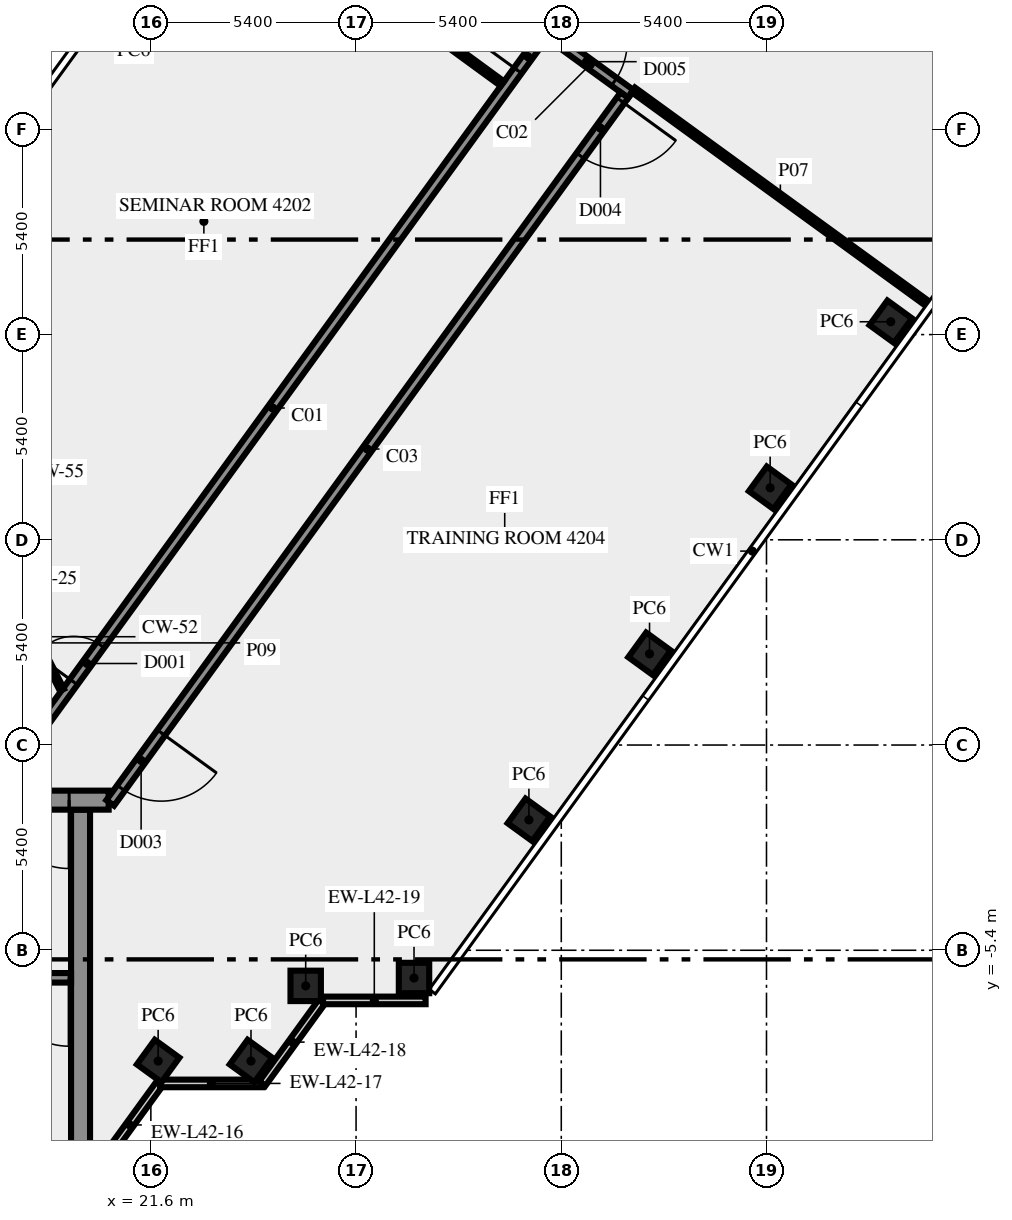
"""IFC4 building model, lengths in metres.
Left out: names, types, materials, properties, quantities, classifications, styles, units other than length and angle.
Written with IfcOpenShell. Run it as: python <this file> out.ifc"""

import sys

from ifc_helpers import new_model, si_unit, direction, frame, frame_2d, origin, origin_2d, place, context, subcontext, project, spatial, rectangle, extrude, element, fill, save


model = new_model("IFC4")
c1 = context("Model", 3, precision=1e-05, world=origin(), true_north=direction((0.0, 1.0)))
c2 = subcontext(c1, "Body", "Model", "MODEL_VIEW")
j1 = project(units=[si_unit("LENGTHUNIT", "METRE"), si_unit("PLANEANGLEUNIT", "RADIAN")], contexts=[c1])
p1 = place(None, origin())
s1 = spatial("IfcSite", under=j1, at=p1, CompositionType="ELEMENT")
p2 = place(p1, origin())
s2 = spatial("IfcBuilding", under=s1, at=p2, CompositionType="ELEMENT")
p3 = place(p2, frame((0.0, 0.0, 180.0)))
s3 = spatial("IfcBuildingStorey", under=s2, at=p3, CompositionType="ELEMENT", Elevation=180.0)
for number, where, z_axis, x_axis in (
    (1, (21.792, -8.315, 0.0), (0.0, 0.0, 1.0), (0.588, 0.809, 0.0)),
    (2, (24.235, -8.315, 0.0), (0.0, 0.0, 1.0), (0.588, 0.809, 0.0)),
    (3, (25.674, -6.337, 0.0), (0.0, 0.0, 1.0), (1.0, 0.0, 0.0)),
    (4, (28.525, -6.13, 0.0), (0.0, 0.0, 1.0), (1.0, 0.0, 0.0)),
    (5, (31.548, -1.969, 0.0), (0.0, 0.0, 1.0), (0.588, 0.809, 0.0)),
    (6, (34.722, 2.4, 0.0), (0.0, 0.0, 1.0), (0.588, 0.809, 0.0)),
    (7, (37.896, 6.769, 0.0), (0.0, 0.0, 1.0), (0.588, 0.809, 0.0)),
    (8, (41.07, 11.137, 0.0), (0.0, 0.0, 1.0), (0.588, 0.809, 0.0)),
):
    element("IfcColumn", number, at=place(p3, frame(where, z_axis=z_axis, x_axis=x_axis)), inside=s3, PredefinedType="COLUMN", context=c2, shape_type="SweptSolid", body=[
        extrude(rectangle(XDim=0.8, YDim=0.8, at=origin_2d()), origin(), (0.0, 0.0, 1.0), 3.65),
    ])
p4 = place(p3, frame((20.253, -11.083, 0.0), z_axis=(0.0, 0.0, 1.0), x_axis=(0.587766567315, 0.809030569476, 0.0)))
e9 = element("IfcWall", 9, at=p4, inside=s3, PredefinedType="SOLIDWALL", context=c2, shape_type="SweptSolid", body=[
    extrude(rectangle(XDim=2.688, YDim=0.2, at=frame_2d((1.344, 0.0))), origin(), (0.0, 0.0, 1.0), 3.65),
])
p5 = place(p3, frame((21.843, -8.904, 0.0), z_axis=(0.0, 0.0, 1.0), x_axis=(1.0, 0.0, 0.0)))
e10 = element("IfcWall", 10, at=p5, inside=s3, PredefinedType="SOLIDWALL", context=c2, shape_type="SweptSolid", body=[
    extrude(rectangle(XDim=2.7, YDim=0.2, at=frame_2d((1.35, 0.0))), origin(), (0.0, 0.0, 1.0), 3.65),
])
p6 = place(p3, frame((24.533, -8.909, 0.0), z_axis=(0.0, 0.0, 1.0), x_axis=(0.587720002413, 0.809064397168, 0.0)))
e11 = element("IfcWall", 11, at=p6, inside=s3, PredefinedType="SOLIDWALL", context=c2, shape_type="SweptSolid", body=[
    extrude(rectangle(XDim=2.7, YDim=0.2, at=frame_2d((1.35, 0.0))), origin(), (0.0, 0.0, 1.0), 3.65),
])
p7 = place(p3, frame((26.13, -6.719, 0.0), z_axis=(0.0, 0.0, 1.0), x_axis=(1.0, 0.0, 0.0)))
e12 = element("IfcWall", 12, at=p7, inside=s3, PredefinedType="SOLIDWALL", context=c2, shape_type="SweptSolid", body=[
    extrude(rectangle(XDim=2.7, YDim=0.2, at=frame_2d((1.35, 0.0))), origin(), (0.0, 0.0, 1.0), 3.65),
])
p8 = place(p3, frame((19.75, -10.5, 0.0), z_axis=(0.0, 0.0, 1.0), x_axis=(0.0, 1.0, 0.0)))
e13 = element("IfcWall", 13, at=p8, inside=s3, PredefinedType="SHEAR", context=c2, shape_type="SweptSolid", body=[
    extrude(rectangle(XDim=8.8, YDim=0.5, at=frame_2d((4.4, 0.0))), origin(), (0.0, 0.0, 1.0), 3.65),
])
p9 = place(p3, frame((19.5, -6.125, 0.0), z_axis=(0.0, 0.0, 1.0), x_axis=(-1.0, 0.0, 0.0)))
e14 = element("IfcWall", 14, at=p9, inside=s3, PredefinedType="SHEAR", context=c2, shape_type="SweptSolid", body=[
    extrude(rectangle(XDim=8.05, YDim=0.25, at=frame_2d((4.025, 0.0))), origin(), (0.0, 0.0, 1.0), 3.65),
])
p10 = place(p9, frame((0.05, 0.0, 0.0)))
e15 = element("IfcOpeningElement", 15, at=p10, cuts=e14, PredefinedType="OPENING", context=c2, shape_type="SweptSolid", body=[
    extrude(rectangle(XDim=1.8, YDim=2.1, at=frame_2d((0.9, 1.05))), frame((0.0, 0.135, 0.0), z_axis=(0.0, -1.0, 0.0), x_axis=(1.0, 0.0, 0.0)), (0.0, 0.0, 1.0), 0.27),
])
p11 = place(p3, frame((20.49, -1.45, 0.0), z_axis=(0.0, 0.0, 1.0), x_axis=(-1.0, 0.0, 0.0)))
e16 = element("IfcWall", 16, at=p11, inside=s3, PredefinedType="SHEAR", context=c2, shape_type="SweptSolid", body=[
    extrude(rectangle(XDim=40.98, YDim=0.5, at=frame_2d((20.49, 0.0))), origin(), (0.0, 0.0, 1.0), 3.65),
])
p12 = place(p11, frame((38.14, 0.0, 0.0)))
e17 = element("IfcOpeningElement", 17, at=p12, cuts=e16, PredefinedType="OPENING", context=c2, shape_type="SweptSolid", body=[
    extrude(rectangle(XDim=1.8, YDim=2.1, at=frame_2d((0.9, 1.05))), frame((0.0, 0.26, 0.0), z_axis=(0.0, -1.0, 0.0), x_axis=(1.0, 0.0, 0.0)), (0.0, 0.0, 1.0), 0.52),
])
p13 = place(p11, frame((35.89, 0.0, 0.0)))
e18 = element("IfcOpeningElement", 18, at=p13, cuts=e16, PredefinedType="OPENING", context=c2, shape_type="SweptSolid", body=[
    extrude(rectangle(XDim=0.9, YDim=2.1, at=frame_2d((0.45, 1.05))), frame((0.0, 0.26, 0.0), z_axis=(0.0, -1.0, 0.0), x_axis=(1.0, 0.0, 0.0)), (0.0, 0.0, 1.0), 0.52),
])
p14 = place(p11, frame((32.94, 0.0, 0.0)))
e19 = element("IfcOpeningElement", 19, at=p14, cuts=e16, PredefinedType="OPENING", context=c2, shape_type="SweptSolid", body=[
    extrude(rectangle(XDim=0.9, YDim=2.1, at=frame_2d((0.45, 1.05))), frame((0.0, 0.26, 0.0), z_axis=(0.0, -1.0, 0.0), x_axis=(1.0, 0.0, 0.0)), (0.0, 0.0, 1.0), 0.52),
])
p15 = place(p11, frame((30.802, 0.0, 0.0)))
e20 = element("IfcOpeningElement", 20, at=p15, cuts=e16, PredefinedType="OPENING", context=c2, shape_type="SweptSolid", body=[
    extrude(rectangle(XDim=0.9, YDim=2.1, at=frame_2d((0.45, 1.05))), frame((0.0, 0.26, 0.0), z_axis=(0.0, -1.0, 0.0), x_axis=(1.0, 0.0, 0.0)), (0.0, 0.0, 1.0), 0.52),
])
p16 = place(p11, frame((29.24, 0.0, 0.0)))
e21 = element("IfcOpeningElement", 21, at=p16, cuts=e16, PredefinedType="OPENING", context=c2, shape_type="SweptSolid", body=[
    extrude(rectangle(XDim=0.9, YDim=2.1, at=frame_2d((0.45, 1.05))), frame((0.0, 0.26, 0.0), z_axis=(0.0, -1.0, 0.0), x_axis=(1.0, 0.0, 0.0)), (0.0, 0.0, 1.0), 0.52),
])
p17 = place(p11, frame((27.39, 0.0, 0.0)))
e22 = element("IfcOpeningElement", 22, at=p17, cuts=e16, PredefinedType="OPENING", context=c2, shape_type="SweptSolid", body=[
    extrude(rectangle(XDim=0.9, YDim=2.1, at=frame_2d((0.45, 1.05))), frame((0.0, 0.26, 0.0), z_axis=(0.0, -1.0, 0.0), x_axis=(1.0, 0.0, 0.0)), (0.0, 0.0, 1.0), 0.52),
])
p18 = place(p11, frame((25.228, 0.0, 0.0)))
e23 = element("IfcOpeningElement", 23, at=p18, cuts=e16, PredefinedType="OPENING", context=c2, shape_type="SweptSolid", body=[
    extrude(rectangle(XDim=0.9, YDim=2.1, at=frame_2d((0.45, 1.05))), frame((0.0, 0.26, 0.0), z_axis=(0.0, -1.0, 0.0), x_axis=(1.0, 0.0, 0.0)), (0.0, 0.0, 1.0), 0.52),
])
p19 = place(p11, frame((19.59, 0.0, 0.0)))
e24 = element("IfcOpeningElement", 24, at=p19, cuts=e16, PredefinedType="OPENING", context=c2, shape_type="SweptSolid", body=[
    extrude(rectangle(XDim=2.0, YDim=2.1, at=frame_2d((1.0, 1.05))), frame((0.0, 0.26, 0.0), z_axis=(0.0, -1.0, 0.0), x_axis=(1.0, 0.0, 0.0)), (0.0, 0.0, 1.0), 0.52),
])
p20 = place(p11, frame((7.14, 0.0, 0.0)))
e25 = element("IfcOpeningElement", 25, at=p20, cuts=e16, PredefinedType="OPENING", context=c2, shape_type="SweptSolid", body=[
    extrude(rectangle(XDim=0.9, YDim=2.1, at=frame_2d((0.45, 1.05))), frame((0.0, 0.26, 0.0), z_axis=(0.0, -1.0, 0.0), x_axis=(1.0, 0.0, 0.0)), (0.0, 0.0, 1.0), 0.52),
])
p21 = place(p11, frame((5.028, 0.0, 0.0)))
e26 = element("IfcOpeningElement", 26, at=p21, cuts=e16, PredefinedType="OPENING", context=c2, shape_type="SweptSolid", body=[
    extrude(rectangle(XDim=0.8, YDim=2.1, at=frame_2d((0.4, 1.05))), frame((0.0, 0.26, 0.0), z_axis=(0.0, -1.0, 0.0), x_axis=(1.0, 0.0, 0.0)), (0.0, 0.0, 1.0), 0.52),
])
p22 = place(p11, frame((3.452, 0.0, 0.0)))
e27 = element("IfcOpeningElement", 27, at=p22, cuts=e16, PredefinedType="OPENING", context=c2, shape_type="SweptSolid", body=[
    extrude(rectangle(XDim=0.8, YDim=2.1, at=frame_2d((0.4, 1.05))), frame((0.0, 0.26, 0.0), z_axis=(0.0, -1.0, 0.0), x_axis=(1.0, 0.0, 0.0)), (0.0, 0.0, 1.0), 0.52),
])
p23 = place(p11, frame((1.04, 0.0, 0.0)))
e28 = element("IfcOpeningElement", 28, at=p23, cuts=e16, PredefinedType="OPENING", context=c2, shape_type="SweptSolid", body=[
    extrude(rectangle(XDim=1.8, YDim=2.1, at=frame_2d((0.9, 1.05))), frame((0.0, 0.26, 0.0), z_axis=(0.0, -1.0, 0.0), x_axis=(1.0, 0.0, 0.0)), (0.0, 0.0, 1.0), 0.52),
])
p24 = place(p3, frame((17.545, -1.125, 0.0), z_axis=(0.0, 0.0, 1.0), x_axis=(0.587791430994, 0.80901250525, 0.0)))
e29 = element("IfcWall", 29, at=p24, inside=s3, PredefinedType="SOLIDWALL", context=c2, shape_type="SweptSolid", body=[
    extrude(rectangle(XDim=24.703, YDim=0.25, at=frame_2d((12.352, 0.0))), origin(), (0.0, 0.0, 1.0), 3.65),
])
p25 = place(p24, frame((23.329, 0.0, 0.0)))
e30 = element("IfcOpeningElement", 30, at=p25, cuts=e29, PredefinedType="OPENING", context=c2, shape_type="SweptSolid", body=[
    extrude(rectangle(XDim=0.9, YDim=2.1, at=frame_2d((0.45, 1.05))), frame((0.0, 0.135, 0.0), z_axis=(0.0, -1.0, 0.0), x_axis=(1.0, 0.0, 0.0)), (0.0, 0.0, 1.0), 0.27),
])
p26 = place(p24, frame((3.442, 0.0, 0.0)))
e31 = element("IfcOpeningElement", 31, at=p26, cuts=e29, PredefinedType="OPENING", context=c2, shape_type="SweptSolid", body=[
    extrude(rectangle(XDim=1.2, YDim=2.1, at=frame_2d((0.6, 1.05))), frame((0.0, 0.135, 0.0), z_axis=(0.0, -1.0, 0.0), x_axis=(1.0, 0.0, 0.0)), (0.0, 0.0, 1.0), 0.27),
])
p27 = place(p3, frame((32.093, 18.686, 0.0), z_axis=(0.0, 0.0, 1.0), x_axis=(0.809006914995, -0.587799125119, 0.0)))
e32 = element("IfcWall", 32, at=p27, inside=s3, PredefinedType="SOLIDWALL", context=c2, shape_type="SweptSolid", body=[
    extrude(rectangle(XDim=2.65, YDim=0.25, at=frame_2d((1.325, 0.0))), origin(), (0.0, 0.0, 1.0), 3.65),
])
p28 = place(p27, frame((0.3, 0.0, 0.0)))
e33 = element("IfcOpeningElement", 33, at=p28, cuts=e32, PredefinedType="OPENING", context=c2, shape_type="SweptSolid", body=[
    extrude(rectangle(XDim=1.8, YDim=2.1, at=frame_2d((0.9, 1.05))), frame((0.0, 0.135, 0.0), z_axis=(0.0, -1.0, 0.0), x_axis=(1.0, 0.0, 0.0)), (0.0, 0.0, 1.0), 0.27),
])
p29 = place(p3, frame((34.062, 17.101, 0.0), z_axis=(0.0, 0.0, 1.0), x_axis=(-0.58778129431, -0.809019870003, 0.0)))
e34 = element("IfcWall", 34, at=p29, inside=s3, PredefinedType="SOLIDWALL", context=c2, shape_type="SweptSolid", body=[
    extrude(rectangle(XDim=23.021, YDim=0.25, at=frame_2d((11.51, 0.0))), origin(), (0.0, 0.0, 1.0), 3.65),
])
p30 = place(p29, frame((20.737, 0.0, 0.0)))
e35 = element("IfcOpeningElement", 35, at=p30, cuts=e34, PredefinedType="OPENING", context=c2, shape_type="SweptSolid", body=[
    extrude(rectangle(XDim=1.8, YDim=2.1, at=frame_2d((0.9, 1.05))), frame((0.0, 0.135, 0.0), z_axis=(0.0, -1.0, 0.0), x_axis=(1.0, 0.0, 0.0)), (0.0, 0.0, 1.0), 0.27),
])
p31 = place(p29, frame((0.174, 0.0, 0.0)))
e36 = element("IfcOpeningElement", 36, at=p31, cuts=e34, PredefinedType="OPENING", context=c2, shape_type="SweptSolid", body=[
    extrude(rectangle(XDim=1.8, YDim=2.1, at=frame_2d((0.9, 1.05))), frame((0.0, 0.135, 0.0), z_axis=(0.0, -1.0, 0.0), x_axis=(1.0, 0.0, 0.0)), (0.0, 0.0, 1.0), 0.27),
])
p32 = place(p3, frame((23.137, 23.032, 0.0), z_axis=(0.0, 0.0, 1.0), x_axis=(0.807661302092, -0.589646691759, 0.0)))
e37 = element("IfcWall", 37, at=p32, inside=s3, PredefinedType="PARTITIONING", context=c2, shape_type="SweptSolid", body=[
    extrude(rectangle(XDim=9.55, YDim=0.15, at=frame_2d((4.775, 0.0))), origin(), (0.0, 0.0, 1.0), 2.85),
])
p33 = place(p3, frame((34.294, 17.241, 0.0), z_axis=(0.0, 0.0, 1.0), x_axis=(0.808985331811, -0.587828829605, 0.0)))
e38 = element("IfcWall", 38, at=p33, inside=s3, PredefinedType="PARTITIONING", context=c2, shape_type="SweptSolid", body=[
    extrude(rectangle(XDim=9.57, YDim=0.15, at=frame_2d((4.785, 0.0))), origin(), (0.0, 0.0, 1.0), 2.85),
])
p34 = place(p3, frame((18.0, 3.925, 0.0), z_axis=(0.0, 0.0, 1.0), x_axis=(0.453950796792, -0.891026752736, 0.0)))
e39 = element("IfcWall", 39, at=p34, inside=s3, PredefinedType="PARTITIONING", context=c2, shape_type="SweptSolid", body=[
    extrude(rectangle(XDim=2.778, YDim=0.12, at=frame_2d((1.389, 0.0))), origin(), (0.0, 0.0, 1.0), 3.65),
])
p35 = place(p10, origin())
e40 = element("IfcDoor", 40, at=p35, inside=s3, OperationType="DOUBLE_DOOR_SINGLE_SWING", PredefinedType="DOOR", context=c2, shape_type="SweptSolid", body=[
    extrude(rectangle(XDim=1.8, YDim=2.1, at=frame_2d((0.9, 1.05))), frame((0.0, 0.025, 0.0), z_axis=(0.0, -1.0, 0.0), x_axis=(1.0, 0.0, 0.0)), (0.0, 0.0, 1.0), 0.05),
])
fill(e15, e40)
p36 = place(p23, origin())
e41 = element("IfcDoor", 41, at=p36, inside=s3, OperationType="DOUBLE_DOOR_SINGLE_SWING", PredefinedType="DOOR", context=c2, shape_type="SweptSolid", body=[
    extrude(rectangle(XDim=1.8, YDim=2.1, at=frame_2d((0.9, 1.05))), frame((0.0, 0.025, 0.0), z_axis=(0.0, -1.0, 0.0), x_axis=(1.0, 0.0, 0.0)), (0.0, 0.0, 1.0), 0.05),
])
fill(e28, e41)
p37 = place(p25, origin())
e42 = element("IfcDoor", 42, at=p37, inside=s3, OperationType="SINGLE_SWING_RIGHT", PredefinedType="DOOR", context=c2, shape_type="SweptSolid", body=[
    extrude(rectangle(XDim=0.9, YDim=2.1, at=frame_2d((0.45, 1.05))), frame((0.0, 0.025, 0.0), z_axis=(0.0, -1.0, 0.0), x_axis=(1.0, 0.0, 0.0)), (0.0, 0.0, 1.0), 0.05),
])
fill(e30, e42)
p38 = place(p28, origin())
e43 = element("IfcDoor", 43, at=p38, inside=s3, OperationType="DOUBLE_DOOR_SINGLE_SWING", PredefinedType="DOOR", context=c2, shape_type="SweptSolid", body=[
    extrude(rectangle(XDim=1.8, YDim=2.1, at=frame_2d((0.9, 1.05))), frame((0.0, 0.025, 0.0), z_axis=(0.0, -1.0, 0.0), x_axis=(1.0, 0.0, 0.0)), (0.0, 0.0, 1.0), 0.05),
])
fill(e33, e43)
p39 = place(p26, origin())
e44 = element("IfcDoor", 44, at=p39, inside=s3, OperationType="SINGLE_SWING_LEFT", PredefinedType="DOOR", context=c2, shape_type="SweptSolid", body=[
    extrude(rectangle(XDim=1.2, YDim=2.1, at=frame_2d((0.6, 1.05))), frame((0.0, 0.025, 0.0), z_axis=(0.0, -1.0, 0.0), x_axis=(1.0, 0.0, 0.0)), (0.0, 0.0, 1.0), 0.05),
])
fill(e31, e44)
p40 = place(p30, origin())
e45 = element("IfcDoor", 45, at=p40, inside=s3, OperationType="DOUBLE_DOOR_SINGLE_SWING", PredefinedType="DOOR", context=c2, shape_type="SweptSolid", body=[
    extrude(rectangle(XDim=1.8, YDim=2.1, at=frame_2d((0.9, 1.05))), frame((0.0, 0.025, 0.0), z_axis=(0.0, -1.0, 0.0), x_axis=(1.0, 0.0, 0.0)), (0.0, 0.0, 1.0), 0.05),
])
fill(e35, e45)
p41 = place(p31, origin())
e46 = element("IfcDoor", 46, at=p41, inside=s3, OperationType="DOUBLE_DOOR_SINGLE_SWING", PredefinedType="DOOR", context=c2, shape_type="SweptSolid", body=[
    extrude(rectangle(XDim=1.8, YDim=2.1, at=frame_2d((0.9, 1.05))), frame((0.0, 0.025, 0.0), z_axis=(0.0, -1.0, 0.0), x_axis=(1.0, 0.0, 0.0)), (0.0, 0.0, 1.0), 0.05),
])
fill(e36, e46)
save(model, sys.argv[1])
